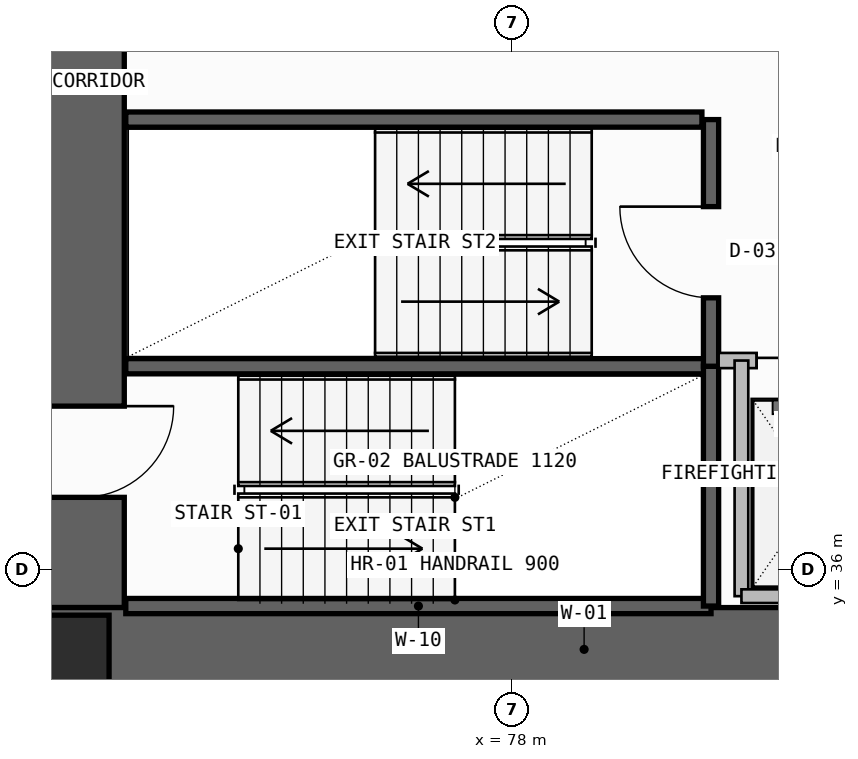
"""IFC4 building model, lengths in metres.
Left out: names, types, materials, properties, quantities, classifications, styles, units other than length and angle.
Written with IfcOpenShell. Run it as: python <this file> out.ifc"""

import sys

from ifc_helpers import new_model, si_unit, direction, frame, frame_2d, origin, origin_2d, place, context, subcontext, project, spatial, rectangle, extrude, element, fill, save


model = new_model("IFC4")
c1 = context("Model", 3, precision=1e-05, world=origin(), true_north=direction((0.0, 1.0)))
c2 = subcontext(c1, "Body", "Model", "MODEL_VIEW")
j1 = project(units=[si_unit("LENGTHUNIT", "METRE"), si_unit("PLANEANGLEUNIT", "RADIAN")], contexts=[c1])
p1 = place(None, origin())
s1 = spatial("IfcSite", under=j1, at=p1, CompositionType="ELEMENT")
p2 = place(p1, origin())
s2 = spatial("IfcBuilding", under=s1, at=p2, CompositionType="ELEMENT")
p3 = place(p2, frame((0.0, 0.0, 84.9)))
s3 = spatial("IfcBuildingStorey", under=s2, at=p3, CompositionType="ELEMENT", Elevation=84.9)
p4 = place(p3, frame((72.35, 35.5, -0.26), z_axis=(0.0, 0.0, 1.0), x_axis=(0.0, 1.0, 0.0)))
e1 = element("IfcWall", 1, at=p4, inside=s3, PredefinedType="SHEAR", context=c2, shape_type="SweptSolid", body=[
    extrude(rectangle(XDim=7.85, YDim=1.1, at=frame_2d((3.925, 0.0))), origin(), (0.0, 0.0, 1.0), 3.6),
])
p5 = place(p4, frame((1.45, 0.0, 0.26)))
e2 = element("IfcOpeningElement", 2, at=p5, cuts=e1, PredefinedType="OPENING", context=c2, shape_type="SweptSolid", body=[
    extrude(rectangle(XDim=1.2, YDim=2.2, at=frame_2d((0.6, 1.1))), frame((0.0, 0.56, 0.0), z_axis=(0.0, -1.0, 0.0), x_axis=(1.0, 0.0, 0.0)), (0.0, 0.0, 1.0), 1.12),
])
p6 = place(p3, frame((71.8, 34.95, -0.26), z_axis=(0.0, 0.0, 1.0), x_axis=(1.0, 0.0, 0.0)))
e3 = element("IfcWall", 3, at=p6, inside=s3, PredefinedType="SHEAR", context=c2, shape_type="SweptSolid", body=[
    extrude(rectangle(XDim=14.3, YDim=1.1, at=frame_2d((7.15, 0.0))), origin(), (0.0, 0.0, 1.0), 3.6),
])
p7 = place(p3, frame((72.0, 34.7, 0.0), z_axis=(0.0, 0.0, 1.0), x_axis=(1.0, 0.0, 0.0)))
e4 = element("IfcColumn", 4, at=p7, inside=s3, PredefinedType="COLUMN", context=c2, shape_type="SweptSolid", body=[
    extrude(rectangle(XDim=1.4, YDim=1.4, at=origin_2d()), origin(), (0.0, 0.0, 1.0), 3.6),
])
for number, where, z_axis, x_axis in (
    (5, (72.92, 35.52, -0.26), (0.0, 0.0, 1.0), (1.0, 0.0, 0.0)),
    (6, (72.92, 38.675, -0.26), (0.0, 0.0, 1.0), (1.0, 0.0, 0.0)),
):
    element("IfcWall", number, at=place(p3, frame(where, z_axis=z_axis, x_axis=x_axis)), inside=s3, PredefinedType="SOLIDWALL", context=c2, shape_type="SweptSolid", body=[
        extrude(rectangle(XDim=7.7, YDim=0.2, at=frame_2d((3.85, 0.0))), origin(), (0.0, 0.0, 1.0), 3.6),
    ])
p8 = place(p3, frame((80.62, 35.52, -0.26), z_axis=(0.0, 0.0, 1.0), x_axis=(0.0, 1.0, 0.0)))
e7 = element("IfcWall", 7, at=p8, inside=s3, PredefinedType="SOLIDWALL", context=c2, shape_type="SweptSolid", body=[
    extrude(rectangle(XDim=3.155, YDim=0.2, at=frame_2d((1.578, 0.0))), origin(), (0.0, 0.0, 1.0), 3.6),
])
p9 = place(p3, frame((80.62, 38.675, -0.26), z_axis=(0.0, 0.0, 1.0), x_axis=(0.0, 1.0, 0.0)))
e8 = element("IfcWall", 8, at=p9, inside=s3, PredefinedType="SOLIDWALL", context=c2, shape_type="SweptSolid", body=[
    extrude(rectangle(XDim=3.245, YDim=0.2, at=frame_2d((1.623, 0.0))), origin(), (0.0, 0.0, 1.0), 3.6),
])
p10 = place(p9, frame((0.9, 0.0, 0.26)))
e9 = element("IfcOpeningElement", 9, at=p10, cuts=e8, PredefinedType="OPENING", context=c2, shape_type="SweptSolid", body=[
    extrude(rectangle(XDim=1.2, YDim=2.2, at=frame_2d((0.6, 1.1))), frame((0.0, 0.11, 0.0), z_axis=(0.0, -1.0, 0.0), x_axis=(1.0, 0.0, 0.0)), (0.0, 0.0, 1.0), 0.22),
])
p11 = place(p3, frame((80.72, 38.75, 0.0), z_axis=(0.0, 0.0, 1.0), x_axis=(1.0, 0.0, 0.0)))
e10 = element("IfcWall", 10, at=p11, inside=s3, PredefinedType="SOLIDWALL", context=c2, shape_type="SweptSolid", body=[
    extrude(rectangle(XDim=4.26, YDim=0.2, at=frame_2d((2.13, 0.0))), origin(), (0.0, 0.0, 1.0), 3.34),
])
p12 = place(p11, frame((0.5, 0.0, 0.0)))
e11 = element("IfcOpeningElement", 11, at=p12, cuts=e10, PredefinedType="OPENING", context=c2, shape_type="SweptSolid", body=[
    extrude(rectangle(XDim=1.3, YDim=2.3, at=frame_2d((0.65, 1.15))), frame((0.0, 0.11, 0.0), z_axis=(0.0, -1.0, 0.0), x_axis=(1.0, 0.0, 0.0)), (0.0, 0.0, 1.0), 0.22),
])
p13 = place(p11, frame((2.45, 0.0, 0.0)))
e12 = element("IfcOpeningElement", 12, at=p13, cuts=e10, PredefinedType="OPENING", context=c2, shape_type="SweptSolid", body=[
    extrude(rectangle(XDim=1.3, YDim=2.3, at=frame_2d((0.65, 1.15))), frame((0.0, 0.11, 0.0), z_axis=(0.0, -1.0, 0.0), x_axis=(1.0, 0.0, 0.0)), (0.0, 0.0, 1.0), 0.22),
])
p14 = place(p3, frame((81.02, 35.65, 0.0), z_axis=(0.0, 0.0, 1.0), x_axis=(0.0, 1.0, 0.0)))
e13 = element("IfcWall", 13, at=p14, inside=s3, PredefinedType="SOLIDWALL", context=c2, shape_type="SweptSolid", body=[
    extrude(rectangle(XDim=3.1, YDim=0.18, at=frame_2d((1.55, 0.0))), origin(), (0.0, 0.0, 1.0), 3.34),
])
p15 = place(p3, frame((81.02, 35.65, 0.0), z_axis=(0.0, 0.0, 1.0), x_axis=(1.0, 0.0, 0.0)))
e14 = element("IfcWall", 14, at=p15, inside=s3, PredefinedType="SOLIDWALL", context=c2, shape_type="SweptSolid", body=[
    extrude(rectangle(XDim=3.93, YDim=0.18, at=frame_2d((1.965, 0.0))), origin(), (0.0, 0.0, 1.0), 3.34),
])
p16 = place(p3, frame((72.92, 41.92, -0.26), z_axis=(0.0, 0.0, 1.0), x_axis=(1.0, 0.0, 0.0)))
e15 = element("IfcWall", 15, at=p16, inside=s3, PredefinedType="SOLIDWALL", context=c2, shape_type="SweptSolid", body=[
    extrude(rectangle(XDim=7.58, YDim=0.2, at=frame_2d((3.79, 0.0))), origin(), (0.0, 0.0, 1.0), 3.6),
])
p17 = place(p5, frame((1.2, 0.0, 0.0), z_axis=(0.0, 0.0, 1.0), x_axis=(-1.0, 0.0, 0.0)))
e16 = element("IfcDoor", 16, at=p17, inside=s3, OperationType="SINGLE_SWING_LEFT", PredefinedType="USERDEFINED", context=c2, shape_type="SweptSolid", body=[
    extrude(rectangle(XDim=1.2, YDim=2.2, at=frame_2d((0.6, 1.1))), frame((0.0, 0.025, 0.0), z_axis=(0.0, -1.0, 0.0), x_axis=(1.0, 0.0, 0.0)), (0.0, 0.0, 1.0), 0.05),
])
fill(e2, e16)
p18 = place(p10, origin())
e17 = element("IfcDoor", 17, at=p18, inside=s3, OperationType="SINGLE_SWING_RIGHT", PredefinedType="USERDEFINED", context=c2, shape_type="SweptSolid", body=[
    extrude(rectangle(XDim=1.2, YDim=2.2, at=frame_2d((0.6, 1.1))), frame((0.0, 0.025, 0.0), z_axis=(0.0, -1.0, 0.0), x_axis=(1.0, 0.0, 0.0)), (0.0, 0.0, 1.0), 0.05),
])
fill(e9, e17)
p19 = place(p12, origin())
e18 = element("IfcDoor", 18, at=p19, inside=s3, OperationType="DOUBLE_DOOR_SLIDING", PredefinedType="DOOR", context=c2, shape_type="SweptSolid", body=[
    extrude(rectangle(XDim=1.3, YDim=2.3, at=frame_2d((0.65, 1.15))), frame((0.0, 0.025, 0.0), z_axis=(0.0, -1.0, 0.0), x_axis=(1.0, 0.0, 0.0)), (0.0, 0.0, 1.0), 0.05),
])
fill(e11, e18)
save(model, sys.argv[1])
